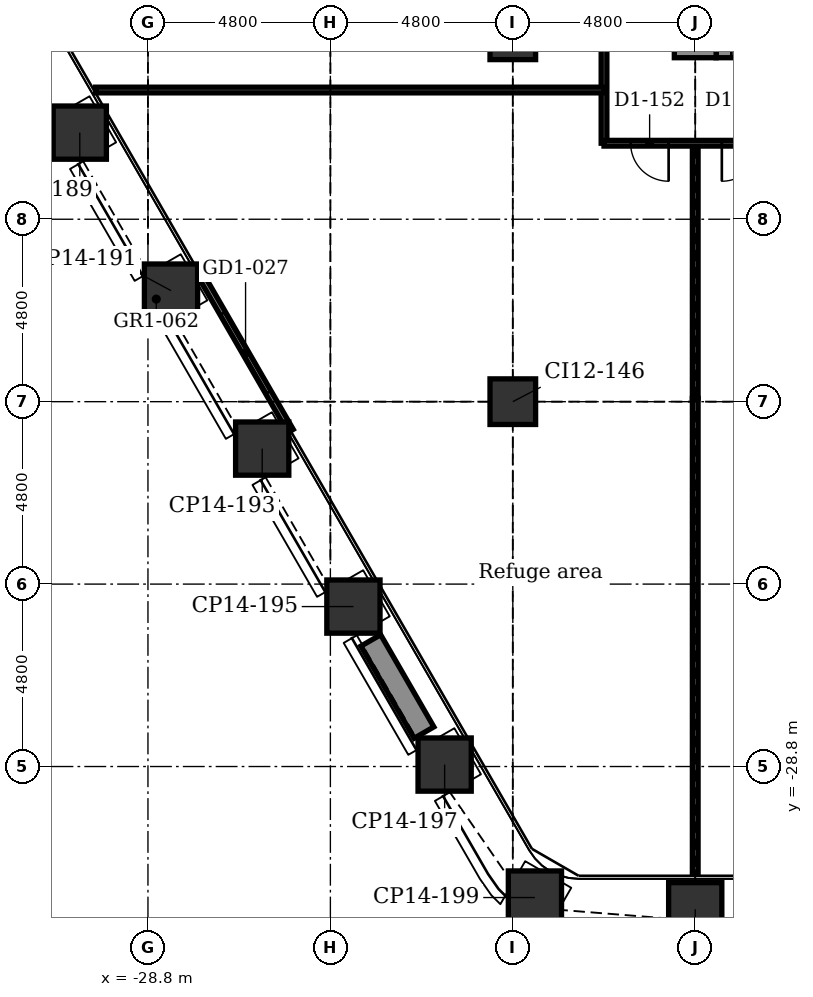
"""IFC4 building model, lengths in metres.
Left out: names, types, materials, properties, quantities, classifications, styles, units other than length and angle.
Written with IfcOpenShell. Run it as: python <this file> out.ifc"""

import sys

from ifc_helpers import new_model, si_unit, direction, frame, frame_2d, origin, origin_2d, place, context, subcontext, project, spatial, rectangle, extrude, element, fill, save


model = new_model("IFC4")
c1 = context("Model", 3, precision=1e-05, world=origin(), true_north=direction((0.0, 1.0)))
c2 = subcontext(c1, "Body", "Model", "MODEL_VIEW")
j1 = project(units=[si_unit("LENGTHUNIT", "METRE"), si_unit("PLANEANGLEUNIT", "RADIAN")], contexts=[c1])
p1 = place(None, origin())
s1 = spatial("IfcSite", under=j1, at=p1, CompositionType="ELEMENT")
p2 = place(p1, origin())
s2 = spatial("IfcBuilding", under=s1, at=p2, CompositionType="ELEMENT")
p3 = place(p2, frame((0.0, 0.0, 66.4)))
s3 = spatial("IfcBuildingStorey", under=s2, at=p3, CompositionType="ELEMENT", Elevation=66.4)
for number, where, z_axis, x_axis in (
    (1, (-14.4, -32.555, -0.3), (0.0, 0.0, 1.0), (1.0, 0.0, 0.0)),
    (2, (-18.618, -32.247, -0.3), (0.0, 0.0, 1.0), (0.5, 0.866, 0.0)),
    (3, (-20.994, -28.749, -0.3), (0.0, 0.0, 1.0), (0.866, 0.5, 0.0)),
    (4, (-23.394, -24.592, -0.3), (0.0, 0.0, 1.0), (0.866, 0.5, 0.0)),
    (5, (-25.794, -20.435, -0.3), (0.0, 0.0, 1.0), (0.866, 0.5, 0.0)),
    (6, (-28.194, -16.278, -0.3), (0.0, 0.0, 1.0), (0.866, 0.5, 0.0)),
    (7, (-30.594, -12.121, -0.3), (0.0, 0.0, 1.0), (0.866, 0.5, 0.0)),
):
    element("IfcColumn", number, at=place(p3, frame(where, z_axis=z_axis, x_axis=x_axis)), inside=s3, PredefinedType="COLUMN", context=c2, shape_type="SweptSolid", body=[
        extrude(rectangle(XDim=1.4, YDim=1.4, at=origin_2d()), origin(), (0.0, 0.0, 1.0), 5.5),
    ])
for number, where, z_axis, x_axis in (
    (8, (-19.2, -19.2, -0.3), (0.0, 0.0, 1.0), (1.0, 0.0, 0.0)),
    (9, (-19.2, -9.6, -0.3), (0.0, 0.0, 1.0), (1.0, 0.0, 0.0)),
):
    element("IfcColumn", number, at=place(p3, frame(where, z_axis=z_axis, x_axis=x_axis)), inside=s3, PredefinedType="COLUMN", context=c2, shape_type="SweptSolid", body=[
        extrude(rectangle(XDim=1.2, YDim=1.2, at=origin_2d()), origin(), (0.0, 0.0, 1.0), 5.5),
    ])
p4 = place(p3, frame((-13.85, -9.6, -0.3), z_axis=(0.0, 0.0, 1.0), x_axis=(1.0, 0.0, 0.0)))
e10 = element("IfcWall", 10, at=p4, inside=s3, PredefinedType="SHEAR", context=c2, shape_type="SweptSolid", body=[
    extrude(rectangle(XDim=3.7, YDim=1.1, at=frame_2d((1.85, 0.0))), origin(), (0.0, 0.0, 1.0), 5.5),
])
p5 = place(p4, frame((0.4, 0.0, 0.3)))
e11 = element("IfcOpeningElement", 11, at=p5, cuts=e10, PredefinedType="OPENING", context=c2, shape_type="SweptSolid", body=[
    extrude(rectangle(XDim=0.9, YDim=2.1, at=frame_2d((0.45, 1.05))), frame((0.0, 0.56, 0.0), z_axis=(0.0, -1.0, 0.0), x_axis=(1.0, 0.0, 0.0)), (0.0, 0.0, 1.0), 1.12),
])
p6 = place(p4, frame((2.75, 0.0, 0.3)))
e12 = element("IfcOpeningElement", 12, at=p6, cuts=e10, PredefinedType="OPENING", context=c2, shape_type="SweptSolid", body=[
    extrude(rectangle(XDim=0.9, YDim=2.1, at=frame_2d((0.45, 1.05))), frame((0.0, 0.56, 0.0), z_axis=(0.0, -1.0, 0.0), x_axis=(1.0, 0.0, 0.0)), (0.0, 0.0, 1.0), 1.12),
])
p7 = place(p3, frame((-14.4, -10.15, -0.3), z_axis=(0.0, 0.0, 1.0), x_axis=(0.0, 1.0, 0.0)))
e13 = element("IfcWall", 13, at=p7, inside=s3, PredefinedType="SHEAR", context=c2, shape_type="SweptSolid", body=[
    extrude(rectangle(XDim=20.3, YDim=1.1, at=frame_2d((10.15, 0.0))), origin(), (0.0, 0.0, 1.0), 5.5),
])
p8 = place(p7, frame((3.6, 0.0, 0.3)))
e14 = element("IfcOpeningElement", 14, at=p8, cuts=e13, PredefinedType="OPENING", context=c2, shape_type="SweptSolid", body=[
    extrude(rectangle(XDim=1.1, YDim=2.1, at=frame_2d((0.55, 1.05))), frame((0.0, 0.56, 0.0), z_axis=(0.0, -1.0, 0.0), x_axis=(1.0, 0.0, 0.0)), (0.0, 0.0, 1.0), 1.12),
])
p9 = place(p7, frame((6.0, 0.0, 0.3)))
e15 = element("IfcOpeningElement", 15, at=p9, cuts=e13, PredefinedType="OPENING", context=c2, shape_type="SweptSolid", body=[
    extrude(rectangle(XDim=1.1, YDim=2.1, at=frame_2d((0.55, 1.05))), frame((0.0, 0.56, 0.0), z_axis=(0.0, -1.0, 0.0), x_axis=(1.0, 0.0, 0.0)), (0.0, 0.0, 1.0), 1.12),
])
p10 = place(p7, frame((8.4, 0.0, 0.3)))
e16 = element("IfcOpeningElement", 16, at=p10, cuts=e13, PredefinedType="OPENING", context=c2, shape_type="SweptSolid", body=[
    extrude(rectangle(XDim=1.1, YDim=2.1, at=frame_2d((0.55, 1.05))), frame((0.0, 0.56, 0.0), z_axis=(0.0, -1.0, 0.0), x_axis=(1.0, 0.0, 0.0)), (0.0, 0.0, 1.0), 1.12),
])
p11 = place(p7, frame((10.8, 0.0, 0.3)))
e17 = element("IfcOpeningElement", 17, at=p11, cuts=e13, PredefinedType="OPENING", context=c2, shape_type="SweptSolid", body=[
    extrude(rectangle(XDim=1.1, YDim=2.1, at=frame_2d((0.55, 1.05))), frame((0.0, 0.56, 0.0), z_axis=(0.0, -1.0, 0.0), x_axis=(1.0, 0.0, 0.0)), (0.0, 0.0, 1.0), 1.12),
])
p12 = place(p3, frame((-25.047, -19.969, 0.0), z_axis=(0.0, 0.0, 1.0), x_axis=(-0.5000167099, 0.866015756104, 0.0)))
e18 = element("IfcWall", 18, at=p12, inside=s3, PredefinedType="PARTITIONING", context=c2, shape_type="SweptSolid", body=[
    extrude(rectangle(XDim=4.74, YDim=0.16, at=frame_2d((2.37, 0.0))), origin(), (0.0, 0.0, 1.0), 5.2),
])
p13 = place(p12, frame((1.17, 0.0, 0.0)))
e19 = element("IfcOpeningElement", 19, at=p13, cuts=e18, PredefinedType="OPENING", context=c2, shape_type="SweptSolid", body=[
    extrude(rectangle(XDim=2.4, YDim=2.4, at=frame_2d((1.2, 1.2))), frame((0.0, 0.09, 0.0), z_axis=(0.0, -1.0, 0.0), x_axis=(1.0, 0.0, 0.0)), (0.0, 0.0, 1.0), 0.18),
])
p14 = place(p3, frame((-21.537, -27.907, 0.0), z_axis=(0.0, 0.0, 1.0), x_axis=(-0.49998411664, 0.866034573852, 0.0)))
e20 = element("IfcWall", 20, at=p14, inside=s3, PredefinedType="USERDEFINED", context=c2, shape_type="SweptSolid", body=[
    extrude(rectangle(XDim=2.8, YDim=0.6, at=frame_2d((1.4, 0.0))), origin(), (0.0, 0.0, 1.0), 0.7),
])
p15 = place(p3, frame((-14.4, -31.585, 0.0), z_axis=(0.0, 0.0, 1.0), x_axis=(0.0, 1.0, 0.0)))
e21 = element("IfcWall", 21, at=p15, inside=s3, PredefinedType="PARTITIONING", context=c2, shape_type="SweptSolid", body=[
    extrude(rectangle(XDim=12.472, YDim=0.15, at=frame_2d((6.236, 0.0))), origin(), (0.0, 0.0, 1.0), 4.516),
])
p16 = place(p3, frame((-14.4, -19.113, 0.0), z_axis=(0.0, 0.0, 1.0), x_axis=(0.0, 1.0, 0.0)))
e22 = element("IfcWall", 22, at=p16, inside=s3, PredefinedType="PARTITIONING", context=c2, shape_type="SweptSolid", body=[
    extrude(rectangle(XDim=6.713, YDim=0.15, at=frame_2d((3.356, 0.0))), origin(), (0.0, 0.0, 1.0), 4.743),
])
p17 = place(p3, frame((-16.8, -12.4, 0.0), z_axis=(0.0, 0.0, 1.0), x_axis=(0.0, 1.0, 0.0)))
e23 = element("IfcWall", 23, at=p17, inside=s3, PredefinedType="PARTITIONING", context=c2, shape_type="SweptSolid", body=[
    extrude(rectangle(XDim=8.45, YDim=0.15, at=frame_2d((4.225, 0.0))), origin(), (0.0, 0.0, 1.0), 5.2),
])
p18 = place(p17, frame((6.565, 0.0, 0.0)))
e24 = element("IfcOpeningElement", 24, at=p18, cuts=e23, PredefinedType="OPENING", context=c2, shape_type="SweptSolid", body=[
    extrude(rectangle(XDim=1.0, YDim=2.1, at=frame_2d((0.5, 1.05))), frame((0.0, 0.085, 0.0), z_axis=(0.0, -1.0, 0.0), x_axis=(1.0, 0.0, 0.0)), (0.0, 0.0, 1.0), 0.17),
])
p19 = place(p3, frame((-16.8, -12.4, 0.0), z_axis=(0.0, 0.0, 1.0), x_axis=(1.0, 0.0, 0.0)))
e25 = element("IfcWall", 25, at=p19, inside=s3, PredefinedType="PARTITIONING", context=c2, shape_type="SweptSolid", body=[
    extrude(rectangle(XDim=38.4, YDim=0.15, at=frame_2d((19.2, 0.0))), origin(), (0.0, 0.0, 1.0), 5.2),
])
p20 = place(p19, frame((0.7, 0.0, 0.0)))
e26 = element("IfcOpeningElement", 26, at=p20, cuts=e25, PredefinedType="OPENING", context=c2, shape_type="SweptSolid", body=[
    extrude(rectangle(XDim=1.0, YDim=2.1, at=frame_2d((0.5, 1.05))), frame((0.0, 0.085, 0.0), z_axis=(0.0, -1.0, 0.0), x_axis=(1.0, 0.0, 0.0)), (0.0, 0.0, 1.0), 0.17),
])
p21 = place(p19, frame((3.1, 0.0, 0.0)))
e27 = element("IfcOpeningElement", 27, at=p21, cuts=e25, PredefinedType="OPENING", context=c2, shape_type="SweptSolid", body=[
    extrude(rectangle(XDim=1.0, YDim=2.1, at=frame_2d((0.5, 1.05))), frame((0.0, 0.085, 0.0), z_axis=(0.0, -1.0, 0.0), x_axis=(1.0, 0.0, 0.0)), (0.0, 0.0, 1.0), 0.17),
])
p22 = place(p19, frame((5.5, 0.0, 0.0)))
e28 = element("IfcOpeningElement", 28, at=p22, cuts=e25, PredefinedType="OPENING", context=c2, shape_type="SweptSolid", body=[
    extrude(rectangle(XDim=1.0, YDim=2.1, at=frame_2d((0.5, 1.05))), frame((0.0, 0.085, 0.0), z_axis=(0.0, -1.0, 0.0), x_axis=(1.0, 0.0, 0.0)), (0.0, 0.0, 1.0), 0.17),
])
p23 = place(p19, frame((9.1, 0.0, 0.0)))
e29 = element("IfcOpeningElement", 29, at=p23, cuts=e25, PredefinedType="OPENING", context=c2, shape_type="SweptSolid", body=[
    extrude(rectangle(XDim=1.0, YDim=2.1, at=frame_2d((0.5, 1.05))), frame((0.0, 0.085, 0.0), z_axis=(0.0, -1.0, 0.0), x_axis=(1.0, 0.0, 0.0)), (0.0, 0.0, 1.0), 0.17),
])
p24 = place(p19, frame((13.9, 0.0, 0.0)))
e30 = element("IfcOpeningElement", 30, at=p24, cuts=e25, PredefinedType="OPENING", context=c2, shape_type="SweptSolid", body=[
    extrude(rectangle(XDim=1.0, YDim=2.1, at=frame_2d((0.5, 1.05))), frame((0.0, 0.085, 0.0), z_axis=(0.0, -1.0, 0.0), x_axis=(1.0, 0.0, 0.0)), (0.0, 0.0, 1.0), 0.17),
])
p25 = place(p19, frame((18.7, 0.0, 0.0)))
e31 = element("IfcOpeningElement", 31, at=p25, cuts=e25, PredefinedType="OPENING", context=c2, shape_type="SweptSolid", body=[
    extrude(rectangle(XDim=1.0, YDim=2.1, at=frame_2d((0.5, 1.05))), frame((0.0, 0.085, 0.0), z_axis=(0.0, -1.0, 0.0), x_axis=(1.0, 0.0, 0.0)), (0.0, 0.0, 1.0), 0.17),
])
p26 = place(p19, frame((23.5, 0.0, 0.0)))
e32 = element("IfcOpeningElement", 32, at=p26, cuts=e25, PredefinedType="OPENING", context=c2, shape_type="SweptSolid", body=[
    extrude(rectangle(XDim=1.0, YDim=2.1, at=frame_2d((0.5, 1.05))), frame((0.0, 0.085, 0.0), z_axis=(0.0, -1.0, 0.0), x_axis=(1.0, 0.0, 0.0)), (0.0, 0.0, 1.0), 0.17),
])
p27 = place(p19, frame((27.1, 0.0, 0.0)))
e33 = element("IfcOpeningElement", 33, at=p27, cuts=e25, PredefinedType="OPENING", context=c2, shape_type="SweptSolid", body=[
    extrude(rectangle(XDim=1.0, YDim=2.1, at=frame_2d((0.5, 1.05))), frame((0.0, 0.085, 0.0), z_axis=(0.0, -1.0, 0.0), x_axis=(1.0, 0.0, 0.0)), (0.0, 0.0, 1.0), 0.17),
])
p28 = place(p19, frame((29.5, 0.0, 0.0)))
e34 = element("IfcOpeningElement", 34, at=p28, cuts=e25, PredefinedType="OPENING", context=c2, shape_type="SweptSolid", body=[
    extrude(rectangle(XDim=1.0, YDim=2.1, at=frame_2d((0.5, 1.05))), frame((0.0, 0.085, 0.0), z_axis=(0.0, -1.0, 0.0), x_axis=(1.0, 0.0, 0.0)), (0.0, 0.0, 1.0), 0.17),
])
p29 = place(p19, frame((31.9, 0.0, 0.0)))
e35 = element("IfcOpeningElement", 35, at=p29, cuts=e25, PredefinedType="OPENING", context=c2, shape_type="SweptSolid", body=[
    extrude(rectangle(XDim=1.0, YDim=2.1, at=frame_2d((0.5, 1.05))), frame((0.0, 0.085, 0.0), z_axis=(0.0, -1.0, 0.0), x_axis=(1.0, 0.0, 0.0)), (0.0, 0.0, 1.0), 0.17),
])
p30 = place(p3, frame((-30.178, -11.0, 0.0), z_axis=(0.0, 0.0, 1.0), x_axis=(1.0, 0.0, 0.0)))
e36 = element("IfcWall", 36, at=p30, inside=s3, PredefinedType="PARTITIONING", context=c2, shape_type="SweptSolid", body=[
    extrude(rectangle(XDim=13.378, YDim=0.15, at=frame_2d((6.689, 0.0))), origin(), (0.0, 0.0, 1.0), 5.2),
])
p31 = place(p13, origin())
e37 = element("IfcDoor", 37, at=p31, inside=s3, OperationType="DOUBLE_DOOR_SLIDING", PredefinedType="DOOR", context=c2, shape_type="SweptSolid", body=[
    extrude(rectangle(XDim=2.4, YDim=2.4, at=frame_2d((1.2, 1.2))), frame((0.0, 0.025, 0.0), z_axis=(0.0, -1.0, 0.0), x_axis=(1.0, 0.0, 0.0)), (0.0, 0.0, 1.0), 0.05),
])
fill(e19, e37)
p32 = place(p20, frame((1.0, 0.0, 0.0), z_axis=(0.0, 0.0, 1.0), x_axis=(-1.0, 0.0, 0.0)))
e38 = element("IfcDoor", 38, at=p32, inside=s3, OperationType="SINGLE_SWING_RIGHT", PredefinedType="DOOR", context=c2, shape_type="SweptSolid", body=[
    extrude(rectangle(XDim=1.0, YDim=2.1, at=frame_2d((0.5, 1.05))), frame((0.0, 0.025, 0.0), z_axis=(0.0, -1.0, 0.0), x_axis=(1.0, 0.0, 0.0)), (0.0, 0.0, 1.0), 0.05),
])
fill(e26, e38)
p33 = place(p21, frame((1.0, 0.0, 0.0), z_axis=(0.0, 0.0, 1.0), x_axis=(-1.0, 0.0, 0.0)))
e39 = element("IfcDoor", 39, at=p33, inside=s3, OperationType="SINGLE_SWING_LEFT", PredefinedType="DOOR", context=c2, shape_type="SweptSolid", body=[
    extrude(rectangle(XDim=1.0, YDim=2.1, at=frame_2d((0.5, 1.05))), frame((0.0, 0.025, 0.0), z_axis=(0.0, -1.0, 0.0), x_axis=(1.0, 0.0, 0.0)), (0.0, 0.0, 1.0), 0.05),
])
fill(e27, e39)
save(model, sys.argv[1])
